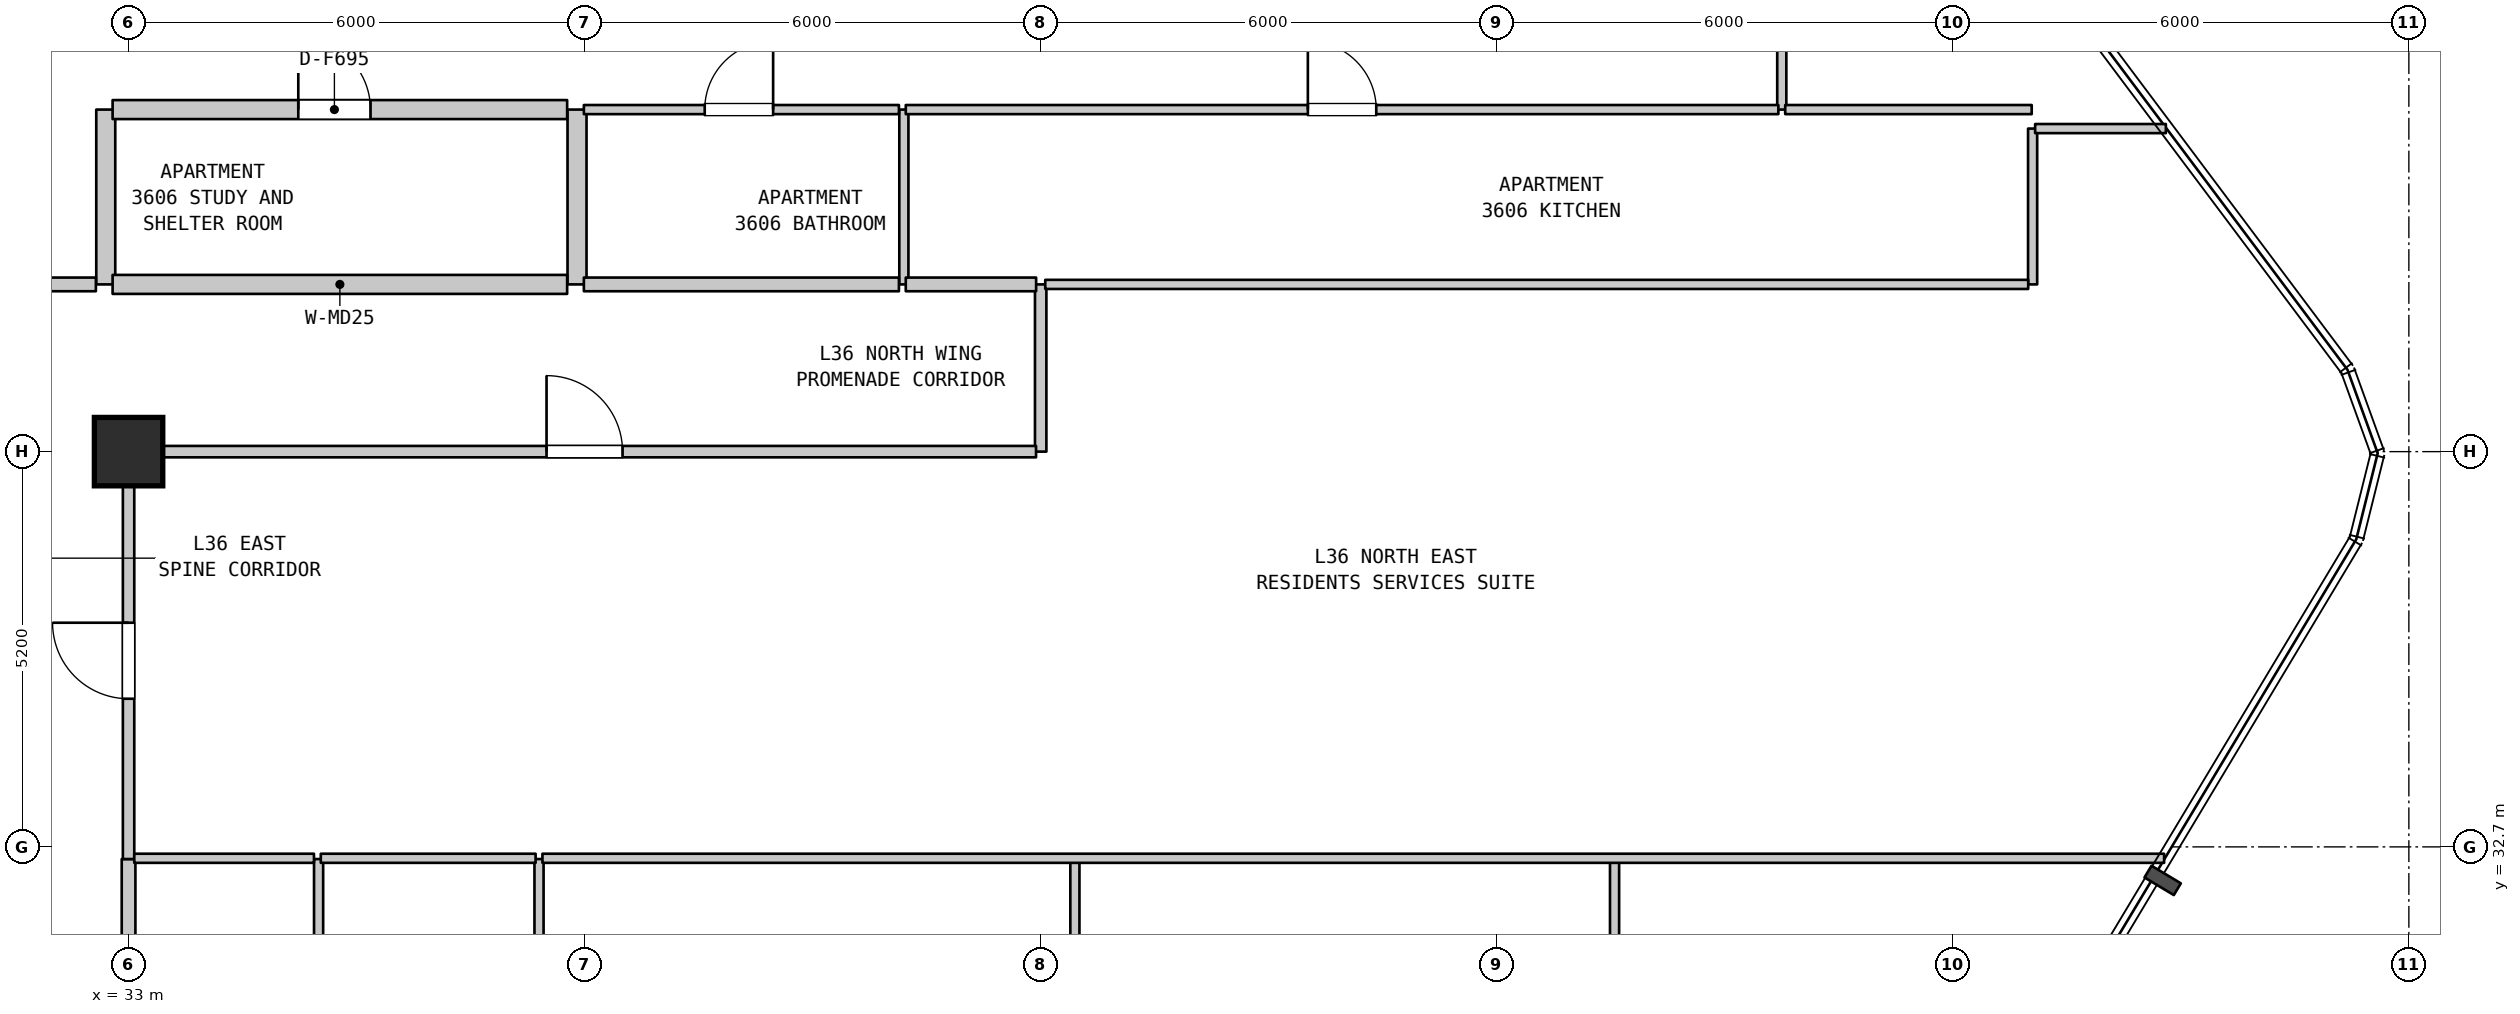
"""IFC4 building model, lengths in metres.
Left out: names, types, materials, properties, quantities, classifications, styles, units other than length and angle.
Written with IfcOpenShell. Run it as: python <this file> out.ifc"""

import sys

from ifc_helpers import new_model, si_unit, direction, frame, frame_2d, origin, origin_2d, place, context, subcontext, project, spatial, rectangle, extrude, element, fill, save


model = new_model("IFC4")
c1 = context("Model", 3, precision=1e-05, world=origin(), true_north=direction((0.0, 1.0)))
c2 = subcontext(c1, "Body", "Model", "MODEL_VIEW")
j1 = project(units=[si_unit("LENGTHUNIT", "METRE"), si_unit("PLANEANGLEUNIT", "RADIAN")], contexts=[c1])
p1 = place(None, origin())
s1 = spatial("IfcSite", under=j1, at=p1, CompositionType="ELEMENT")
p2 = place(p1, origin())
s2 = spatial("IfcBuilding", under=s1, at=p2, CompositionType="ELEMENT")
p3 = place(p2, frame((0.0, 0.0, 148.3)))
s3 = spatial("IfcBuildingStorey", under=s2, at=p3, CompositionType="ELEMENT", Elevation=148.3)
p4 = place(p3, frame((33.0, 37.9, 0.0), z_axis=(0.0, 0.0, 1.0), x_axis=(1.0, 0.0, 0.0)))
e1 = element("IfcColumn", 1, at=p4, inside=s3, PredefinedType="COLUMN", context=c2, shape_type="SweptSolid", body=[
    extrude(rectangle(XDim=0.9, YDim=0.9, at=origin_2d()), origin(), (0.0, 0.0, 1.0), 3.7),
])
p5 = place(p3, frame((32.7, 40.1, 0.0), z_axis=(0.0, 0.0, 1.0), x_axis=(0.0, 1.0, 0.0)))
e2 = element("IfcWall", 2, at=p5, inside=s3, PredefinedType="STANDARD", context=c2, shape_type="SweptSolid", body=[
    extrude(rectangle(XDim=2.3, YDim=0.25, at=frame_2d((1.15, 0.0))), origin(), (0.0, 0.0, 1.0), 3.385),
])
p6 = place(p3, frame((33.0, 27.47, 0.0), z_axis=(0.0, 0.0, 1.0), x_axis=(0.0, 1.0, 0.0)))
e3 = element("IfcWall", 3, at=p6, inside=s3, PredefinedType="STANDARD", context=c2, shape_type="SweptSolid", body=[
    extrude(rectangle(XDim=5.07, YDim=0.18, at=frame_2d((2.535, 0.0))), origin(), (0.0, 0.0, 1.0), 2.885),
])
p7 = place(p3, frame((33.0, 32.54, 0.0), z_axis=(0.0, 0.0, 1.0), x_axis=(0.0, 1.0, 0.0)))
e4 = element("IfcWall", 4, at=p7, inside=s3, PredefinedType="STANDARD", context=c2, shape_type="SweptSolid", body=[
    extrude(rectangle(XDim=5.36, YDim=0.15, at=frame_2d((2.68, 0.0))), origin(), (0.0, 0.0, 1.0), 2.885),
])
p8 = place(p7, frame((2.109, 0.0, 0.0)))
e5 = element("IfcOpeningElement", 5, at=p8, cuts=e4, PredefinedType="OPENING", context=c2, shape_type="SweptSolid", body=[
    extrude(rectangle(XDim=1.0, YDim=2.15, at=frame_2d((0.5, 1.075))), frame((0.0, 0.085, 0.0), z_axis=(0.0, -1.0, 0.0), x_axis=(1.0, 0.0, 0.0)), (0.0, 0.0, 1.0), 0.17),
])
for number, where, z_axis, x_axis in (
    (6, (35.5, 27.47, 0.0), (0.0, 0.0, 1.0), (0.0, 1.0, 0.0)),
    (7, (38.4, 27.47, 0.0), (0.0, 0.0, 1.0), (0.0, 1.0, 0.0)),
):
    element("IfcWall", number, at=place(p3, frame(where, z_axis=z_axis, x_axis=x_axis)), inside=s3, PredefinedType="PARTITIONING", context=c2, shape_type="SweptSolid", body=[
        extrude(rectangle(XDim=5.07, YDim=0.12, at=frame_2d((2.535, 0.0))), origin(), (0.0, 0.0, 1.0), 3.385),
    ])
p9 = place(p3, frame((38.9, 40.1, 0.0), z_axis=(0.0, 0.0, 1.0), x_axis=(0.0, 1.0, 0.0)))
e8 = element("IfcWall", 8, at=p9, inside=s3, PredefinedType="STANDARD", context=c2, shape_type="SweptSolid", body=[
    extrude(rectangle(XDim=2.3, YDim=0.25, at=frame_2d((1.15, 0.0))), origin(), (0.0, 0.0, 1.0), 3.385),
])
p10 = place(p3, frame((43.2, 40.1, 0.0), z_axis=(0.0, 0.0, 1.0), x_axis=(0.0, 1.0, 0.0)))
e9 = element("IfcWall", 9, at=p10, inside=s3, PredefinedType="PARTITIONING", context=c2, shape_type="SweptSolid", body=[
    extrude(rectangle(XDim=2.3, YDim=0.12, at=frame_2d((1.15, 0.0))), origin(), (0.0, 0.0, 1.0), 3.385),
])
p11 = place(p3, frame((45.0, 37.9, 0.0), z_axis=(0.0, 0.0, 1.0), x_axis=(0.0, 1.0, 0.0)))
e10 = element("IfcWall", 10, at=p11, inside=s3, PredefinedType="STANDARD", context=c2, shape_type="SweptSolid", body=[
    extrude(rectangle(XDim=2.2, YDim=0.15, at=frame_2d((1.1, 0.0))), origin(), (0.0, 0.0, 1.0), 3.385),
])
for number, where, z_axis, x_axis in (
    (11, (45.45, 27.47, 0.0), (0.0, 0.0, 1.0), (0.0, 1.0, 0.0)),
    (12, (52.55, 27.47, 0.0), (0.0, 0.0, 1.0), (0.0, 1.0, 0.0)),
):
    element("IfcWall", number, at=place(p3, frame(where, z_axis=z_axis, x_axis=x_axis)), inside=s3, PredefinedType="PARTITIONING", context=c2, shape_type="SweptSolid", body=[
        extrude(rectangle(XDim=5.07, YDim=0.12, at=frame_2d((2.535, 0.0))), origin(), (0.0, 0.0, 1.0), 3.385),
    ])
p12 = place(p3, frame((54.75, 42.4, 0.0), z_axis=(0.0, 0.0, 1.0), x_axis=(0.0, 1.0, 0.0)))
e13 = element("IfcWall", 13, at=p12, inside=s3, PredefinedType="PARTITIONING", context=c2, shape_type="SweptSolid", body=[
    extrude(rectangle(XDim=3.05, YDim=0.12, at=frame_2d((1.525, 0.0))), origin(), (0.0, 0.0, 1.0), 3.385),
])
p13 = place(p12, frame((1.003, 0.0, 0.0)))
e14 = element("IfcOpeningElement", 14, at=p13, cuts=e13, PredefinedType="OPENING", context=c2, shape_type="SweptSolid", body=[
    extrude(rectangle(XDim=0.9, YDim=2.15, at=frame_2d((0.45, 1.075))), frame((0.0, 0.07, 0.0), z_axis=(0.0, -1.0, 0.0), x_axis=(1.0, 0.0, 0.0)), (0.0, 0.0, 1.0), 0.14),
])
p14 = place(p3, frame((58.05, 40.1, 0.0), z_axis=(0.0, 0.0, 1.0), x_axis=(0.0, 1.0, 0.0)))
e15 = element("IfcWall", 15, at=p14, inside=s3, PredefinedType="PARTITIONING", context=c2, shape_type="SweptSolid", body=[
    extrude(rectangle(XDim=2.05, YDim=0.12, at=frame_2d((1.025, 0.0))), origin(), (0.0, 0.0, 1.0), 3.385),
])
p15 = place(p3, frame((33.075, 32.55, 0.0), z_axis=(0.0, 0.0, 1.0), x_axis=(1.0, 0.0, 0.0)))
e16 = element("IfcWall", 16, at=p15, inside=s3, PredefinedType="PARTITIONING", context=c2, shape_type="SweptSolid", body=[
    extrude(rectangle(XDim=2.364, YDim=0.12, at=frame_2d((1.182, 0.0))), origin(), (0.0, 0.0, 1.0), 3.385),
])
p16 = place(p3, frame((35.529, 32.55, 0.0), z_axis=(0.0, 0.0, 1.0), x_axis=(1.0, 0.0, 0.0)))
e17 = element("IfcWall", 17, at=p16, inside=s3, PredefinedType="PARTITIONING", context=c2, shape_type="SweptSolid", body=[
    extrude(rectangle(XDim=2.826, YDim=0.12, at=frame_2d((1.413, 0.0))), origin(), (0.0, 0.0, 1.0), 3.385),
])
p17 = place(p3, frame((38.445, 32.55, 0.0), z_axis=(0.0, 0.0, 1.0), x_axis=(1.0, 0.0, 0.0)))
e18 = element("IfcWall", 18, at=p17, inside=s3, PredefinedType="PARTITIONING", context=c2, shape_type="SweptSolid", body=[
    extrude(rectangle(XDim=21.335, YDim=0.12, at=frame_2d((10.667, 0.0))), origin(), (0.0, 0.0, 1.0), 3.385),
])
p18 = place(p3, frame((33.06, 37.9, 0.0), z_axis=(0.0, 0.0, 1.0), x_axis=(1.0, 0.0, 0.0)))
e19 = element("IfcWall", 19, at=p18, inside=s3, PredefinedType="STANDARD", context=c2, shape_type="SweptSolid", body=[
    extrude(rectangle(XDim=11.879, YDim=0.15, at=frame_2d((5.939, 0.0))), origin(), (0.0, 0.0, 1.0), 3.385),
])
p19 = place(p18, frame((5.439, 0.0, 0.0)))
e20 = element("IfcOpeningElement", 20, at=p19, cuts=e19, PredefinedType="OPENING", context=c2, shape_type="SweptSolid", body=[
    extrude(rectangle(XDim=1.0, YDim=2.15, at=frame_2d((0.5, 1.075))), frame((0.0, 0.085, 0.0), z_axis=(0.0, -1.0, 0.0), x_axis=(1.0, 0.0, 0.0)), (0.0, 0.0, 1.0), 0.17),
])
p20 = place(p3, frame((22.225, 40.1, 0.0), z_axis=(0.0, 0.0, 1.0), x_axis=(1.0, 0.0, 0.0)))
e21 = element("IfcWall", 21, at=p20, inside=s3, PredefinedType="STANDARD", context=c2, shape_type="SweptSolid", body=[
    extrude(rectangle(XDim=10.345, YDim=0.18, at=frame_2d((5.172, 0.0))), origin(), (0.0, 0.0, 1.0), 3.385),
])
p21 = place(p20, frame((2.305, 0.0, 0.0)))
e22 = element("IfcOpeningElement", 22, at=p21, cuts=e21, PredefinedType="OPENING", context=c2, shape_type="SweptSolid", body=[
    extrude(rectangle(XDim=1.0, YDim=2.15, at=frame_2d((0.5, 1.075))), frame((0.0, 0.1, 0.0), z_axis=(0.0, -1.0, 0.0), x_axis=(1.0, 0.0, 0.0)), (0.0, 0.0, 1.0), 0.2),
])
p22 = place(p20, frame((7.235, 0.0, 0.0)))
e23 = element("IfcOpeningElement", 23, at=p22, cuts=e21, PredefinedType="OPENING", context=c2, shape_type="SweptSolid", body=[
    extrude(rectangle(XDim=1.0, YDim=2.15, at=frame_2d((0.5, 1.075))), frame((0.0, 0.1, 0.0), z_axis=(0.0, -1.0, 0.0), x_axis=(1.0, 0.0, 0.0)), (0.0, 0.0, 1.0), 0.2),
])
p23 = place(p3, frame((32.79, 40.1, 0.0), z_axis=(0.0, 0.0, 1.0), x_axis=(1.0, 0.0, 0.0)))
e24 = element("IfcWall", 24, at=p23, inside=s3, PredefinedType="STANDARD", context=c2, shape_type="SweptSolid", body=[
    extrude(rectangle(XDim=5.98, YDim=0.25, at=frame_2d((2.99, 0.0))), origin(), (0.0, 0.0, 1.0), 3.385),
])
p24 = place(p3, frame((38.99, 40.1, 0.0), z_axis=(0.0, 0.0, 1.0), x_axis=(1.0, 0.0, 0.0)))
e25 = element("IfcWall", 25, at=p24, inside=s3, PredefinedType="STANDARD", context=c2, shape_type="SweptSolid", body=[
    extrude(rectangle(XDim=4.145, YDim=0.18, at=frame_2d((2.073, 0.0))), origin(), (0.0, 0.0, 1.0), 3.385),
])
p25 = place(p3, frame((43.225, 40.1, 0.0), z_axis=(0.0, 0.0, 1.0), x_axis=(1.0, 0.0, 0.0)))
e26 = element("IfcWall", 26, at=p25, inside=s3, PredefinedType="STANDARD", context=c2, shape_type="SweptSolid", body=[
    extrude(rectangle(XDim=1.715, YDim=0.18, at=frame_2d((0.857, 0.0))), origin(), (0.0, 0.0, 1.0), 3.385),
])
p26 = place(p3, frame((45.06, 40.1, 0.0), z_axis=(0.0, 0.0, 1.0), x_axis=(1.0, 0.0, 0.0)))
e27 = element("IfcWall", 27, at=p26, inside=s3, PredefinedType="PARTITIONING", context=c2, shape_type="SweptSolid", body=[
    extrude(rectangle(XDim=12.932, YDim=0.12, at=frame_2d((6.466, 0.0))), origin(), (0.0, 0.0, 1.0), 3.385),
])
p27 = place(p3, frame((58.083, 42.15, 0.0), z_axis=(0.0, 0.0, 1.0), x_axis=(1.0, 0.0, 0.0)))
e28 = element("IfcWall", 28, at=p27, inside=s3, PredefinedType="PARTITIONING", context=c2, shape_type="SweptSolid", body=[
    extrude(rectangle(XDim=1.72, YDim=0.12, at=frame_2d((0.86, 0.0))), origin(), (0.0, 0.0, 1.0), 3.385),
])
p28 = place(p3, frame((32.79, 42.4, 0.0), z_axis=(0.0, 0.0, 1.0), x_axis=(1.0, 0.0, 0.0)))
e29 = element("IfcWall", 29, at=p28, inside=s3, PredefinedType="STANDARD", context=c2, shape_type="SweptSolid", body=[
    extrude(rectangle(XDim=5.98, YDim=0.25, at=frame_2d((2.99, 0.0))), origin(), (0.0, 0.0, 1.0), 3.385),
])
p29 = place(p28, frame((2.443, 0.0, 0.0)))
e30 = element("IfcOpeningElement", 30, at=p29, cuts=e29, PredefinedType="OPENING", context=c2, shape_type="SweptSolid", body=[
    extrude(rectangle(XDim=0.95, YDim=2.15, at=frame_2d((0.475, 1.075))), frame((0.0, 0.135, 0.0), z_axis=(0.0, -1.0, 0.0), x_axis=(1.0, 0.0, 0.0)), (0.0, 0.0, 1.0), 0.27),
])
p30 = place(p3, frame((38.99, 42.4, 0.0), z_axis=(0.0, 0.0, 1.0), x_axis=(1.0, 0.0, 0.0)))
e31 = element("IfcWall", 31, at=p30, inside=s3, PredefinedType="PARTITIONING", context=c2, shape_type="SweptSolid", body=[
    extrude(rectangle(XDim=4.145, YDim=0.12, at=frame_2d((2.073, 0.0))), origin(), (0.0, 0.0, 1.0), 3.385),
])
p31 = place(p30, frame((1.59, 0.0, 0.0)))
e32 = element("IfcOpeningElement", 32, at=p31, cuts=e31, PredefinedType="OPENING", context=c2, shape_type="SweptSolid", body=[
    extrude(rectangle(XDim=0.9, YDim=2.1, at=frame_2d((0.45, 1.05))), frame((0.0, 0.07, 0.0), z_axis=(0.0, -1.0, 0.0), x_axis=(1.0, 0.0, 0.0)), (0.0, 0.0, 1.0), 0.14),
])
p32 = place(p3, frame((43.225, 42.4, 0.0), z_axis=(0.0, 0.0, 1.0), x_axis=(1.0, 0.0, 0.0)))
e33 = element("IfcWall", 33, at=p32, inside=s3, PredefinedType="PARTITIONING", context=c2, shape_type="SweptSolid", body=[
    extrude(rectangle(XDim=11.48, YDim=0.12, at=frame_2d((5.74, 0.0))), origin(), (0.0, 0.0, 1.0), 3.385),
])
p33 = place(p32, frame((5.29, 0.0, 0.0)))
e34 = element("IfcOpeningElement", 34, at=p33, cuts=e33, PredefinedType="OPENING", context=c2, shape_type="SweptSolid", body=[
    extrude(rectangle(XDim=0.9, YDim=2.15, at=frame_2d((0.45, 1.075))), frame((0.0, 0.07, 0.0), z_axis=(0.0, -1.0, 0.0), x_axis=(1.0, 0.0, 0.0)), (0.0, 0.0, 1.0), 0.14),
])
p34 = place(p3, frame((54.795, 42.4, 0.0), z_axis=(0.0, 0.0, 1.0), x_axis=(1.0, 0.0, 0.0)))
e35 = element("IfcWall", 35, at=p34, inside=s3, PredefinedType="PARTITIONING", context=c2, shape_type="SweptSolid", body=[
    extrude(rectangle(XDim=3.243, YDim=0.12, at=frame_2d((1.622, 0.0))), origin(), (0.0, 0.0, 1.0), 3.385),
])
p35 = place(p8, origin())
e36 = element("IfcDoor", 36, at=p35, inside=s3, OperationType="SINGLE_SWING_RIGHT", PredefinedType="DOOR", context=c2, shape_type="SweptSolid", body=[
    extrude(rectangle(XDim=1.0, YDim=2.15, at=frame_2d((0.5, 1.075))), frame((0.0, 0.025, 0.0), z_axis=(0.0, -1.0, 0.0), x_axis=(1.0, 0.0, 0.0)), (0.0, 0.0, 1.0), 0.05),
])
fill(e5, e36)
p36 = place(p19, origin())
e37 = element("IfcDoor", 37, at=p36, inside=s3, OperationType="SINGLE_SWING_LEFT", PredefinedType="DOOR", context=c2, shape_type="SweptSolid", body=[
    extrude(rectangle(XDim=1.0, YDim=2.15, at=frame_2d((0.5, 1.075))), frame((0.0, 0.025, 0.0), z_axis=(0.0, -1.0, 0.0), x_axis=(1.0, 0.0, 0.0)), (0.0, 0.0, 1.0), 0.05),
])
fill(e20, e37)
p37 = place(p29, origin())
e38 = element("IfcDoor", 38, at=p37, inside=s3, OperationType="SINGLE_SWING_LEFT", PredefinedType="DOOR", context=c2, shape_type="SweptSolid", body=[
    extrude(rectangle(XDim=0.95, YDim=2.15, at=frame_2d((0.475, 1.075))), frame((0.0, 0.025, 0.0), z_axis=(0.0, -1.0, 0.0), x_axis=(1.0, 0.0, 0.0)), (0.0, 0.0, 1.0), 0.05),
])
fill(e30, e38)
p38 = place(p31, origin())
e39 = element("IfcDoor", 39, at=p38, inside=s3, OperationType="SINGLE_SWING_RIGHT", PredefinedType="DOOR", context=c2, shape_type="SweptSolid", body=[
    extrude(rectangle(XDim=0.9, YDim=2.1, at=frame_2d((0.45, 1.05))), frame((0.0, 0.025, 0.0), z_axis=(0.0, -1.0, 0.0), x_axis=(1.0, 0.0, 0.0)), (0.0, 0.0, 1.0), 0.05),
])
fill(e32, e39)
p39 = place(p33, origin())
e40 = element("IfcDoor", 40, at=p39, inside=s3, OperationType="SINGLE_SWING_LEFT", PredefinedType="DOOR", context=c2, shape_type="SweptSolid", body=[
    extrude(rectangle(XDim=0.9, YDim=2.15, at=frame_2d((0.45, 1.075))), frame((0.0, 0.025, 0.0), z_axis=(0.0, -1.0, 0.0), x_axis=(1.0, 0.0, 0.0)), (0.0, 0.0, 1.0), 0.05),
])
fill(e34, e40)
save(model, sys.argv[1])
